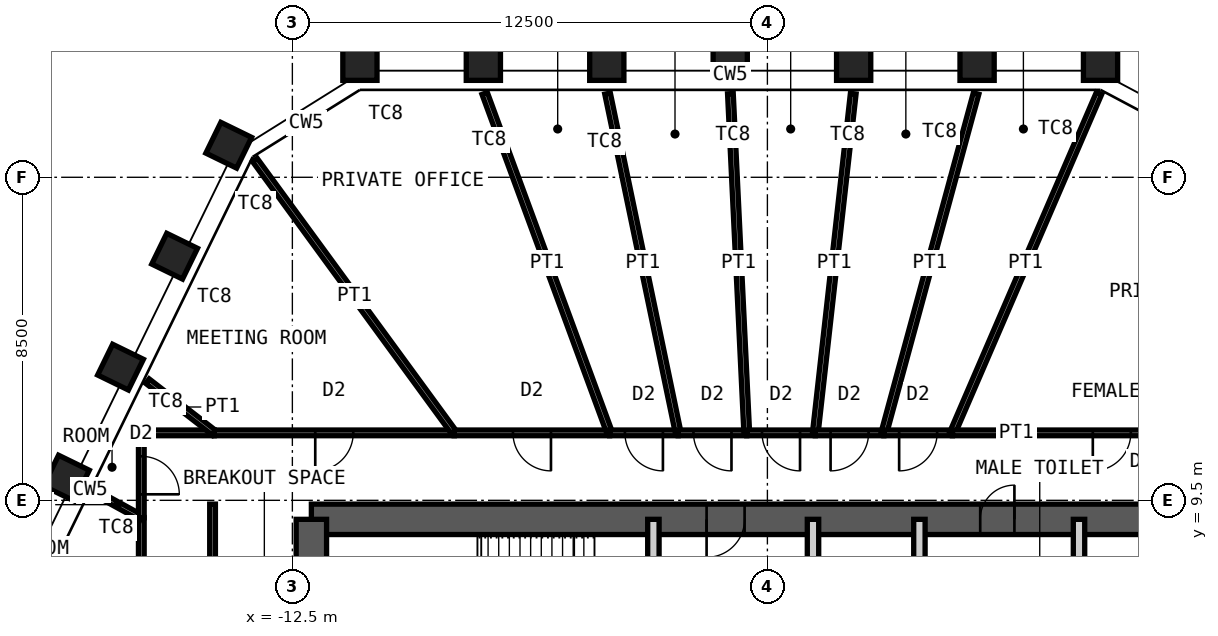
"""IFC4 building model, lengths in metres.
Left out: names, types, materials, properties, quantities, classifications, styles, units other than length and angle.
Written with IfcOpenShell. Run it as: python <this file> out.ifc"""

import sys

from ifc_helpers import new_model, si_unit, direction, frame, frame_2d, origin, origin_2d, place, context, subcontext, project, spatial, rectangle, hollow_rectangle, extrude, element, fill, save


model = new_model("IFC4")
c1 = context("Model", 3, precision=1e-05, world=origin(), true_north=direction((0.0, 1.0)))
c2 = subcontext(c1, "Body", "Model", "MODEL_VIEW")
j1 = project(units=[si_unit("LENGTHUNIT", "METRE"), si_unit("PLANEANGLEUNIT", "RADIAN")], contexts=[c1])
p1 = place(None, origin())
s1 = spatial("IfcSite", under=j1, at=p1, CompositionType="ELEMENT")
p2 = place(p1, origin())
s2 = spatial("IfcBuilding", under=s1, at=p2, CompositionType="ELEMENT")
p3 = place(p2, frame((0.0, 0.0, 316.6)))
s3 = spatial("IfcBuildingStorey", under=s2, at=p3, CompositionType="ELEMENT", Elevation=316.6)
for number, where, z_axis, x_axis in (
    (1, (-10.722, 21.0, 0.0), (0.0, 0.0, 1.0), (-1.0, 0.0, 0.0)),
    (2, (-7.474, 21.0, 0.0), (0.0, 0.0, 1.0), (-1.0, 0.0, 0.0)),
    (3, (-4.226, 21.0, 0.0), (0.0, 0.0, 1.0), (-1.0, 0.0, 0.0)),
    (4, (-0.978, 21.0, 0.0), (0.0, 0.0, 1.0), (-1.0, 0.0, 0.0)),
    (5, (2.27, 21.0, 0.0), (0.0, 0.0, 1.0), (-1.0, 0.0, 0.0)),
    (6, (5.518, 21.0, 0.0), (0.0, 0.0, 1.0), (-1.0, 0.0, 0.0)),
    (7, (8.766, 21.0, 0.0), (0.0, 0.0, 1.0), (-1.0, 0.0, 0.0)),
    (8, (-18.446, 10.085, 0.0), (0.0, 0.0, 1.0), (-0.438, -0.899, 0.0)),
    (9, (-17.022, 13.004, 0.0), (0.0, 0.0, 1.0), (-0.438, -0.899, 0.0)),
    (10, (-15.598, 15.924, 0.0), (0.0, 0.0, 1.0), (-0.438, -0.899, 0.0)),
    (11, (-14.174, 18.843, 0.0), (0.0, 0.0, 1.0), (-0.438, -0.899, 0.0)),
):
    element("IfcColumn", number, at=place(p3, frame(where, z_axis=z_axis, x_axis=x_axis)), inside=s3, PredefinedType="COLUMN", context=c2, shape_type="SweptSolid", body=[
        extrude(hollow_rectangle(XDim=0.9, YDim=0.9, WallThickness=0.05, at=origin_2d()), origin(), (0.0, 0.0, 1.0), 4.2),
    ])
p4 = place(p3, frame((-12.0, 9.0, 0.0), z_axis=(0.0, 0.0, 1.0), x_axis=(1.0, 0.0, 0.0)))
e12 = element("IfcWall", 12, at=p4, inside=s3, PredefinedType="SHEAR", context=c2, shape_type="SweptSolid", body=[
    extrude(rectangle(XDim=24.0, YDim=0.8, at=frame_2d((12.0, 0.0))), origin(), (0.0, 0.0, 1.0), 4.2),
])
p5 = place(p4, frame((10.4, 0.0, 0.0)))
e13 = element("IfcOpeningElement", 13, at=p5, cuts=e12, PredefinedType="OPENING", context=c2, shape_type="SweptSolid", body=[
    extrude(rectangle(XDim=1.0, YDim=2.1, at=frame_2d((0.5, 1.05))), frame((0.0, 0.41, 0.0), z_axis=(0.0, -1.0, 0.0), x_axis=(1.0, 0.0, 0.0)), (0.0, 0.0, 1.0), 0.82),
])
p6 = place(p4, frame((17.6, 0.0, 0.0)))
e14 = element("IfcOpeningElement", 14, at=p6, cuts=e12, PredefinedType="OPENING", context=c2, shape_type="SweptSolid", body=[
    extrude(rectangle(XDim=0.9, YDim=2.1, at=frame_2d((0.45, 1.05))), frame((0.0, 0.41, 0.0), z_axis=(0.0, -1.0, 0.0), x_axis=(1.0, 0.0, 0.0)), (0.0, 0.0, 1.0), 0.82),
])
p7 = place(p4, frame((21.9, 0.0, 0.0)))
e15 = element("IfcOpeningElement", 15, at=p7, cuts=e12, PredefinedType="OPENING", context=c2, shape_type="SweptSolid", body=[
    extrude(rectangle(XDim=0.9, YDim=2.1, at=frame_2d((0.45, 1.05))), frame((0.0, 0.41, 0.0), z_axis=(0.0, -1.0, 0.0), x_axis=(1.0, 0.0, 0.0)), (0.0, 0.0, 1.0), 0.82),
])
p8 = place(p3, frame((-12.0, -9.0, 0.0), z_axis=(0.0, 0.0, 1.0), x_axis=(0.0, 1.0, 0.0)))
e16 = element("IfcWall", 16, at=p8, inside=s3, PredefinedType="SHEAR", context=c2, shape_type="SweptSolid", body=[
    extrude(rectangle(XDim=18.0, YDim=0.8, at=frame_2d((9.0, 0.0))), origin(), (0.0, 0.0, 1.0), 4.2),
])
p9 = place(p8, frame((8.1, 0.0, 0.0)))
e17 = element("IfcOpeningElement", 17, at=p9, cuts=e16, PredefinedType="OPENING", context=c2, shape_type="SweptSolid", body=[
    extrude(rectangle(XDim=1.8, YDim=2.1, at=frame_2d((0.9, 1.05))), frame((0.0, 0.41, 0.0), z_axis=(0.0, -1.0, 0.0), x_axis=(1.0, 0.0, 0.0)), (0.0, 0.0, 1.0), 0.82),
])
p10 = place(p3, frame((-3.0, 5.15, 0.0), z_axis=(0.0, 0.0, 1.0), x_axis=(0.0, 1.0, 0.0)))
e18 = element("IfcWall", 18, at=p10, inside=s3, PredefinedType="PARTITIONING", context=c2, shape_type="SweptSolid", body=[
    extrude(rectangle(XDim=3.85, YDim=0.3, at=frame_2d((1.925, 0.0))), origin(), (0.0, 0.0, 1.0), 3.98),
])
p11 = place(p10, frame((1.425, 0.0, 0.0)))
e19 = element("IfcOpeningElement", 19, at=p11, cuts=e18, PredefinedType="OPENING", context=c2, shape_type="SweptSolid", body=[
    extrude(rectangle(XDim=1.0, YDim=2.1, at=frame_2d((0.5, 1.05))), frame((0.0, 0.16, 0.0), z_axis=(0.0, -1.0, 0.0), x_axis=(1.0, 0.0, 0.0)), (0.0, 0.0, 1.0), 0.32),
])
p12 = place(p3, frame((1.2, 5.15, 0.0), z_axis=(0.0, 0.0, 1.0), x_axis=(0.0, 1.0, 0.0)))
e20 = element("IfcWall", 20, at=p12, inside=s3, PredefinedType="PARTITIONING", context=c2, shape_type="SweptSolid", body=[
    extrude(rectangle(XDim=3.85, YDim=0.3, at=frame_2d((1.925, 0.0))), origin(), (0.0, 0.0, 1.0), 3.98),
])
p13 = place(p12, frame((1.375, 0.0, 0.0)))
e21 = element("IfcOpeningElement", 21, at=p13, cuts=e20, PredefinedType="OPENING", context=c2, shape_type="SweptSolid", body=[
    extrude(rectangle(XDim=1.1, YDim=2.4, at=frame_2d((0.55, 1.2))), frame((0.0, 0.16, 0.0), z_axis=(0.0, -1.0, 0.0), x_axis=(1.0, 0.0, 0.0)), (0.0, 0.0, 1.0), 0.32),
])
for number, where, z_axis, x_axis in (
    (22, (4.0, 5.15, 0.0), (0.0, 0.0, 1.0), (0.0, 1.0, 0.0)),
    (23, (8.2, 5.15, 0.0), (0.0, 0.0, 1.0), (0.0, 1.0, 0.0)),
):
    element("IfcWall", number, at=place(p3, frame(where, z_axis=z_axis, x_axis=x_axis)), inside=s3, PredefinedType="PARTITIONING", context=c2, shape_type="SweptSolid", body=[
        extrude(rectangle(XDim=3.85, YDim=0.3, at=frame_2d((1.925, 0.0))), origin(), (0.0, 0.0, 1.0), 3.98),
    ])
p14 = place(p3, frame((-16.475, 5.873, 0.0), z_axis=(0.0, 0.0, 1.0), x_axis=(0.0, 1.0, 0.0)))
e24 = element("IfcWall", 24, at=p14, inside=s3, PredefinedType="PARTITIONING", context=c2, shape_type="SweptSolid", body=[
    extrude(rectangle(XDim=3.169, YDim=0.15, at=frame_2d((1.584, 0.0))), origin(), (0.0, 0.0, 1.0), 4.03),
])
p15 = place(p14, frame((1.084, 0.0, 0.0)))
e25 = element("IfcOpeningElement", 25, at=p15, cuts=e24, PredefinedType="OPENING", context=c2, shape_type="SweptSolid", body=[
    extrude(rectangle(XDim=1.0, YDim=2.4, at=frame_2d((0.5, 1.2))), frame((0.0, 0.085, 0.0), z_axis=(0.0, -1.0, 0.0), x_axis=(1.0, 0.0, 0.0)), (0.0, 0.0, 1.0), 0.17),
])
p16 = place(p3, frame((-17.729, 9.73, 0.0), z_axis=(0.0, 0.0, 1.0), x_axis=(0.876633607687, -0.481158516369, 0.0)))
e26 = element("IfcWall", 26, at=p16, inside=s3, PredefinedType="PARTITIONING", context=c2, shape_type="SweptSolid", body=[
    extrude(rectangle(XDim=1.43, YDim=0.15, at=frame_2d((0.715, 0.0))), origin(), (0.0, 0.0, 1.0), 3.33),
])
p17 = place(p3, frame((-16.475, 9.042, 0.0), z_axis=(0.0, 0.0, 1.0), x_axis=(0.0, 1.0, 0.0)))
e27 = element("IfcWall", 27, at=p17, inside=s3, PredefinedType="PARTITIONING", context=c2, shape_type="SweptSolid", body=[
    extrude(rectangle(XDim=2.233, YDim=0.15, at=frame_2d((1.117, 0.0))), origin(), (0.0, 0.0, 1.0), 4.03),
])
p18 = place(p17, frame((0.617, 0.0, 0.0)))
e28 = element("IfcOpeningElement", 28, at=p18, cuts=e27, PredefinedType="OPENING", context=c2, shape_type="SweptSolid", body=[
    extrude(rectangle(XDim=1.0, YDim=2.4, at=frame_2d((0.5, 1.2))), frame((0.0, 0.085, 0.0), z_axis=(0.0, -1.0, 0.0), x_axis=(1.0, 0.0, 0.0)), (0.0, 0.0, 1.0), 0.17),
])
p19 = place(p3, frame((-16.475, 11.275, 0.0), z_axis=(0.0, 0.0, 1.0), x_axis=(1.0, 0.0, 0.0)))
e29 = element("IfcWall", 29, at=p19, inside=s3, PredefinedType="PARTITIONING", context=c2, shape_type="SweptSolid", body=[
    extrude(rectangle(XDim=1.919, YDim=0.15, at=frame_2d((0.959, 0.0))), origin(), (0.0, 0.0, 1.0), 4.03),
])
p20 = place(p3, frame((-16.314, 12.636, 0.0), z_axis=(0.0, 0.0, 1.0), x_axis=(0.790545318909, -0.612403542406, 0.0)))
e30 = element("IfcWall", 30, at=p20, inside=s3, PredefinedType="PARTITIONING", context=c2, shape_type="SweptSolid", body=[
    extrude(rectangle(XDim=2.223, YDim=0.15, at=frame_2d((1.111, 0.0))), origin(), (0.0, 0.0, 1.0), 3.33),
])
p21 = place(p3, frame((-14.556, 11.275, 0.0), z_axis=(0.0, 0.0, 1.0), x_axis=(1.0, 0.0, 0.0)))
e31 = element("IfcWall", 31, at=p21, inside=s3, PredefinedType="PARTITIONING", context=c2, shape_type="SweptSolid", body=[
    extrude(rectangle(XDim=6.317, YDim=0.15, at=frame_2d((3.159, 0.0))), origin(), (0.0, 0.0, 1.0), 4.03),
])
p22 = place(p21, frame((2.659, 0.0, 0.0)))
e32 = element("IfcOpeningElement", 32, at=p22, cuts=e31, PredefinedType="OPENING", context=c2, shape_type="SweptSolid", body=[
    extrude(rectangle(XDim=1.0, YDim=2.4, at=frame_2d((0.5, 1.2))), frame((0.0, 0.085, 0.0), z_axis=(0.0, -1.0, 0.0), x_axis=(1.0, 0.0, 0.0)), (0.0, 0.0, 1.0), 0.17),
])
p23 = place(p3, frame((-13.486, 18.455, 0.0), z_axis=(0.0, 0.0, 1.0), x_axis=(0.589986991866, -0.80741275035, 0.0)))
e33 = element("IfcWall", 33, at=p23, inside=s3, PredefinedType="PARTITIONING", context=c2, shape_type="SweptSolid", body=[
    extrude(rectangle(XDim=8.893, YDim=0.15, at=frame_2d((4.447, 0.0))), origin(), (0.0, 0.0, 1.0), 2.93),
])
p24 = place(p3, frame((-8.239, 11.275, 0.0), z_axis=(0.0, 0.0, 1.0), x_axis=(1.0, 0.0, 0.0)))
e34 = element("IfcWall", 34, at=p24, inside=s3, PredefinedType="PARTITIONING", context=c2, shape_type="SweptSolid", body=[
    extrude(rectangle(XDim=4.088, YDim=0.15, at=frame_2d((2.044, 0.0))), origin(), (0.0, 0.0, 1.0), 4.03),
])
p25 = place(p24, frame((1.544, 0.0, 0.0)))
e35 = element("IfcOpeningElement", 35, at=p25, cuts=e34, PredefinedType="OPENING", context=c2, shape_type="SweptSolid", body=[
    extrude(rectangle(XDim=1.0, YDim=2.4, at=frame_2d((0.5, 1.2))), frame((0.0, 0.085, 0.0), z_axis=(0.0, -1.0, 0.0), x_axis=(1.0, 0.0, 0.0)), (0.0, 0.0, 1.0), 0.17),
])
p26 = place(p3, frame((-7.44, 20.206, 0.0), z_axis=(0.0, 0.0, 1.0), x_axis=(0.345511582319, -0.93841448544, 0.0)))
e36 = element("IfcWall", 36, at=p26, inside=s3, PredefinedType="PARTITIONING", context=c2, shape_type="SweptSolid", body=[
    extrude(rectangle(XDim=9.517, YDim=0.15, at=frame_2d((4.759, 0.0))), origin(), (0.0, 0.0, 1.0), 3.33),
])
p27 = place(p3, frame((-4.151, 11.275, 0.0), z_axis=(0.0, 0.0, 1.0), x_axis=(1.0, 0.0, 0.0)))
e37 = element("IfcWall", 37, at=p27, inside=s3, PredefinedType="PARTITIONING", context=c2, shape_type="SweptSolid", body=[
    extrude(rectangle(XDim=1.804, YDim=0.15, at=frame_2d((0.902, 0.0))), origin(), (0.0, 0.0, 1.0), 4.03),
])
p28 = place(p27, frame((0.402, 0.0, 0.0)))
e38 = element("IfcOpeningElement", 38, at=p28, cuts=e37, PredefinedType="OPENING", context=c2, shape_type="SweptSolid", body=[
    extrude(rectangle(XDim=1.0, YDim=2.4, at=frame_2d((0.5, 1.2))), frame((0.0, 0.085, 0.0), z_axis=(0.0, -1.0, 0.0), x_axis=(1.0, 0.0, 0.0)), (0.0, 0.0, 1.0), 0.17),
])
p29 = place(p3, frame((-4.206, 20.202, 0.0), z_axis=(0.0, 0.0, 1.0), x_axis=(0.203802429316, -0.97901203762, 0.0)))
e39 = element("IfcWall", 39, at=p29, inside=s3, PredefinedType="PARTITIONING", context=c2, shape_type="SweptSolid", body=[
    extrude(rectangle(XDim=9.119, YDim=0.15, at=frame_2d((4.559, 0.0))), origin(), (0.0, 0.0, 1.0), 3.33),
])
p30 = place(p3, frame((-2.347, 11.275, 0.0), z_axis=(0.0, 0.0, 1.0), x_axis=(1.0, 0.0, 0.0)))
e40 = element("IfcWall", 40, at=p30, inside=s3, PredefinedType="PARTITIONING", context=c2, shape_type="SweptSolid", body=[
    extrude(rectangle(XDim=1.804, YDim=0.15, at=frame_2d((0.902, 0.0))), origin(), (0.0, 0.0, 1.0), 4.03),
])
p31 = place(p30, frame((0.402, 0.0, 0.0)))
e41 = element("IfcOpeningElement", 41, at=p31, cuts=e40, PredefinedType="OPENING", context=c2, shape_type="SweptSolid", body=[
    extrude(rectangle(XDim=1.0, YDim=2.4, at=frame_2d((0.5, 1.2))), frame((0.0, 0.085, 0.0), z_axis=(0.0, -1.0, 0.0), x_axis=(1.0, 0.0, 0.0)), (0.0, 0.0, 1.0), 0.17),
])
p32 = place(p3, frame((-0.973, 20.2, 0.0), z_axis=(0.0, 0.0, 1.0), x_axis=(0.04814150135, -0.998840525734, 0.0)))
e42 = element("IfcWall", 42, at=p32, inside=s3, PredefinedType="PARTITIONING", context=c2, shape_type="SweptSolid", body=[
    extrude(rectangle(XDim=8.936, YDim=0.15, at=frame_2d((4.468, 0.0))), origin(), (0.0, 0.0, 1.0), 3.33),
])
p33 = place(p3, frame((-0.543, 11.275, 0.0), z_axis=(0.0, 0.0, 1.0), x_axis=(1.0, 0.0, 0.0)))
e43 = element("IfcWall", 43, at=p33, inside=s3, PredefinedType="PARTITIONING", context=c2, shape_type="SweptSolid", body=[
    extrude(rectangle(XDim=1.804, YDim=0.15, at=frame_2d((0.902, 0.0))), origin(), (0.0, 0.0, 1.0), 4.03),
])
p34 = place(p33, frame((0.402, 0.0, 0.0)))
e44 = element("IfcOpeningElement", 44, at=p34, cuts=e43, PredefinedType="OPENING", context=c2, shape_type="SweptSolid", body=[
    extrude(rectangle(XDim=1.0, YDim=2.4, at=frame_2d((0.5, 1.2))), frame((0.0, 0.085, 0.0), z_axis=(0.0, -1.0, 0.0), x_axis=(1.0, 0.0, 0.0)), (0.0, 0.0, 1.0), 0.17),
])
p35 = place(p3, frame((2.259, 20.201, 0.0), z_axis=(0.0, 0.0, 1.0), x_axis=(-0.111123668582, -0.993806585952, 0.0)))
e45 = element("IfcWall", 45, at=p35, inside=s3, PredefinedType="PARTITIONING", context=c2, shape_type="SweptSolid", body=[
    extrude(rectangle(XDim=8.981, YDim=0.15, at=frame_2d((4.491, 0.0))), origin(), (0.0, 0.0, 1.0), 3.33),
])
p36 = place(p3, frame((1.261, 11.275, 0.0), z_axis=(0.0, 0.0, 1.0), x_axis=(1.0, 0.0, 0.0)))
e46 = element("IfcWall", 46, at=p36, inside=s3, PredefinedType="PARTITIONING", context=c2, shape_type="SweptSolid", body=[
    extrude(rectangle(XDim=1.804, YDim=0.15, at=frame_2d((0.902, 0.0))), origin(), (0.0, 0.0, 1.0), 4.03),
])
p37 = place(p36, frame((0.402, 0.0, 0.0)))
e47 = element("IfcOpeningElement", 47, at=p37, cuts=e46, PredefinedType="OPENING", context=c2, shape_type="SweptSolid", body=[
    extrude(rectangle(XDim=1.0, YDim=2.4, at=frame_2d((0.5, 1.2))), frame((0.0, 0.085, 0.0), z_axis=(0.0, -1.0, 0.0), x_axis=(1.0, 0.0, 0.0)), (0.0, 0.0, 1.0), 0.17),
])
p38 = place(p3, frame((5.492, 20.204, 0.0), z_axis=(0.0, 0.0, 1.0), x_axis=(-0.262302393053, -0.964985727666, 0.0)))
e48 = element("IfcWall", 48, at=p38, inside=s3, PredefinedType="PARTITIONING", context=c2, shape_type="SweptSolid", body=[
    extrude(rectangle(XDim=9.253, YDim=0.15, at=frame_2d((4.626, 0.0))), origin(), (0.0, 0.0, 1.0), 3.33),
])
p39 = place(p3, frame((3.065, 11.275, 0.0), z_axis=(0.0, 0.0, 1.0), x_axis=(1.0, 0.0, 0.0)))
e49 = element("IfcWall", 49, at=p39, inside=s3, PredefinedType="PARTITIONING", context=c2, shape_type="SweptSolid", body=[
    extrude(rectangle(XDim=1.804, YDim=0.15, at=frame_2d((0.902, 0.0))), origin(), (0.0, 0.0, 1.0), 4.03),
])
p40 = place(p39, frame((0.402, 0.0, 0.0)))
e50 = element("IfcOpeningElement", 50, at=p40, cuts=e49, PredefinedType="OPENING", context=c2, shape_type="SweptSolid", body=[
    extrude(rectangle(XDim=1.0, YDim=2.4, at=frame_2d((0.5, 1.2))), frame((0.0, 0.085, 0.0), z_axis=(0.0, -1.0, 0.0), x_axis=(1.0, 0.0, 0.0)), (0.0, 0.0, 1.0), 0.17),
])
p41 = place(p3, frame((8.726, 20.208, 0.0), z_axis=(0.0, 0.0, 1.0), x_axis=(-0.39644322536, -0.918059240499, 0.0)))
e51 = element("IfcWall", 51, at=p41, inside=s3, PredefinedType="PARTITIONING", context=c2, shape_type="SweptSolid", body=[
    extrude(rectangle(XDim=9.731, YDim=0.15, at=frame_2d((4.865, 0.0))), origin(), (0.0, 0.0, 1.0), 2.93),
])
p42 = place(p3, frame((4.869, 11.275, 0.0), z_axis=(0.0, 0.0, 1.0), x_axis=(1.0, 0.0, 0.0)))
e52 = element("IfcWall", 52, at=p42, inside=s3, PredefinedType="PARTITIONING", context=c2, shape_type="SweptSolid", body=[
    extrude(rectangle(XDim=8.389, YDim=0.15, at=frame_2d((4.194, 0.0))), origin(), (0.0, 0.0, 1.0), 4.03),
])
p43 = place(p42, frame((3.694, 0.0, 0.0)))
e53 = element("IfcOpeningElement", 53, at=p43, cuts=e52, PredefinedType="OPENING", context=c2, shape_type="SweptSolid", body=[
    extrude(rectangle(XDim=1.0, YDim=2.4, at=frame_2d((0.5, 1.2))), frame((0.0, 0.085, 0.0), z_axis=(0.0, -1.0, 0.0), x_axis=(1.0, 0.0, 0.0)), (0.0, 0.0, 1.0), 0.17),
])
p44 = place(p3, frame((-14.6, 1.9, 0.0), z_axis=(0.0, 0.0, 1.0), x_axis=(0.0, 1.0, 0.0)))
e54 = element("IfcWall", 54, at=p44, inside=s3, PredefinedType="PARTITIONING", context=c2, shape_type="SweptSolid", body=[
    extrude(rectangle(XDim=7.5, YDim=0.15, at=frame_2d((3.75, 0.0))), origin(), (0.0, 0.0, 1.0), 4.03),
])
p45 = place(p5, origin())
e55 = element("IfcDoor", 55, at=p45, inside=s3, OperationType="SINGLE_SWING_LEFT", PredefinedType="DOOR", context=c2, shape_type="SweptSolid", body=[
    extrude(rectangle(XDim=1.0, YDim=2.1, at=frame_2d((0.5, 1.05))), frame((0.0, 0.025, 0.0), z_axis=(0.0, -1.0, 0.0), x_axis=(1.0, 0.0, 0.0)), (0.0, 0.0, 1.0), 0.05),
])
fill(e13, e55)
p46 = place(p6, origin())
e56 = element("IfcDoor", 56, at=p46, inside=s3, OperationType="SINGLE_SWING_LEFT", PredefinedType="DOOR", context=c2, shape_type="SweptSolid", body=[
    extrude(rectangle(XDim=0.9, YDim=2.1, at=frame_2d((0.45, 1.05))), frame((0.0, 0.025, 0.0), z_axis=(0.0, -1.0, 0.0), x_axis=(1.0, 0.0, 0.0)), (0.0, 0.0, 1.0), 0.05),
])
fill(e14, e56)
p47 = place(p18, origin())
e57 = element("IfcDoor", 57, at=p47, inside=s3, OperationType="SINGLE_SWING_LEFT", PredefinedType="DOOR", context=c2, shape_type="SweptSolid", body=[
    extrude(rectangle(XDim=1.0, YDim=2.4, at=frame_2d((0.5, 1.2))), frame((0.0, 0.025, 0.0), z_axis=(0.0, -1.0, 0.0), x_axis=(1.0, 0.0, 0.0)), (0.0, 0.0, 1.0), 0.05),
])
fill(e28, e57)
p48 = place(p22, origin())
e58 = element("IfcDoor", 58, at=p48, inside=s3, OperationType="SINGLE_SWING_LEFT", PredefinedType="DOOR", context=c2, shape_type="SweptSolid", body=[
    extrude(rectangle(XDim=1.0, YDim=2.4, at=frame_2d((0.5, 1.2))), frame((0.0, 0.025, 0.0), z_axis=(0.0, -1.0, 0.0), x_axis=(1.0, 0.0, 0.0)), (0.0, 0.0, 1.0), 0.05),
])
fill(e32, e58)
p49 = place(p25, origin())
e59 = element("IfcDoor", 59, at=p49, inside=s3, OperationType="SINGLE_SWING_RIGHT", PredefinedType="DOOR", context=c2, shape_type="SweptSolid", body=[
    extrude(rectangle(XDim=1.0, YDim=2.4, at=frame_2d((0.5, 1.2))), frame((0.0, 0.025, 0.0), z_axis=(0.0, -1.0, 0.0), x_axis=(1.0, 0.0, 0.0)), (0.0, 0.0, 1.0), 0.05),
])
fill(e35, e59)
p50 = place(p28, origin())
e60 = element("IfcDoor", 60, at=p50, inside=s3, OperationType="SINGLE_SWING_RIGHT", PredefinedType="DOOR", context=c2, shape_type="SweptSolid", body=[
    extrude(rectangle(XDim=1.0, YDim=2.4, at=frame_2d((0.5, 1.2))), frame((0.0, 0.025, 0.0), z_axis=(0.0, -1.0, 0.0), x_axis=(1.0, 0.0, 0.0)), (0.0, 0.0, 1.0), 0.05),
])
fill(e38, e60)
p51 = place(p31, origin())
e61 = element("IfcDoor", 61, at=p51, inside=s3, OperationType="SINGLE_SWING_RIGHT", PredefinedType="DOOR", context=c2, shape_type="SweptSolid", body=[
    extrude(rectangle(XDim=1.0, YDim=2.4, at=frame_2d((0.5, 1.2))), frame((0.0, 0.025, 0.0), z_axis=(0.0, -1.0, 0.0), x_axis=(1.0, 0.0, 0.0)), (0.0, 0.0, 1.0), 0.05),
])
fill(e41, e61)
p52 = place(p34, origin())
e62 = element("IfcDoor", 62, at=p52, inside=s3, OperationType="SINGLE_SWING_RIGHT", PredefinedType="DOOR", context=c2, shape_type="SweptSolid", body=[
    extrude(rectangle(XDim=1.0, YDim=2.4, at=frame_2d((0.5, 1.2))), frame((0.0, 0.025, 0.0), z_axis=(0.0, -1.0, 0.0), x_axis=(1.0, 0.0, 0.0)), (0.0, 0.0, 1.0), 0.05),
])
fill(e44, e62)
p53 = place(p37, origin())
e63 = element("IfcDoor", 63, at=p53, inside=s3, OperationType="SINGLE_SWING_LEFT", PredefinedType="DOOR", context=c2, shape_type="SweptSolid", body=[
    extrude(rectangle(XDim=1.0, YDim=2.4, at=frame_2d((0.5, 1.2))), frame((0.0, 0.025, 0.0), z_axis=(0.0, -1.0, 0.0), x_axis=(1.0, 0.0, 0.0)), (0.0, 0.0, 1.0), 0.05),
])
fill(e47, e63)
p54 = place(p40, origin())
e64 = element("IfcDoor", 64, at=p54, inside=s3, OperationType="SINGLE_SWING_LEFT", PredefinedType="DOOR", context=c2, shape_type="SweptSolid", body=[
    extrude(rectangle(XDim=1.0, YDim=2.4, at=frame_2d((0.5, 1.2))), frame((0.0, 0.025, 0.0), z_axis=(0.0, -1.0, 0.0), x_axis=(1.0, 0.0, 0.0)), (0.0, 0.0, 1.0), 0.05),
])
fill(e50, e64)
p55 = place(p43, origin())
e65 = element("IfcDoor", 65, at=p55, inside=s3, OperationType="SINGLE_SWING_LEFT", PredefinedType="DOOR", context=c2, shape_type="SweptSolid", body=[
    extrude(rectangle(XDim=1.0, YDim=2.4, at=frame_2d((0.5, 1.2))), frame((0.0, 0.025, 0.0), z_axis=(0.0, -1.0, 0.0), x_axis=(1.0, 0.0, 0.0)), (0.0, 0.0, 1.0), 0.05),
])
fill(e53, e65)
save(model, sys.argv[1])
